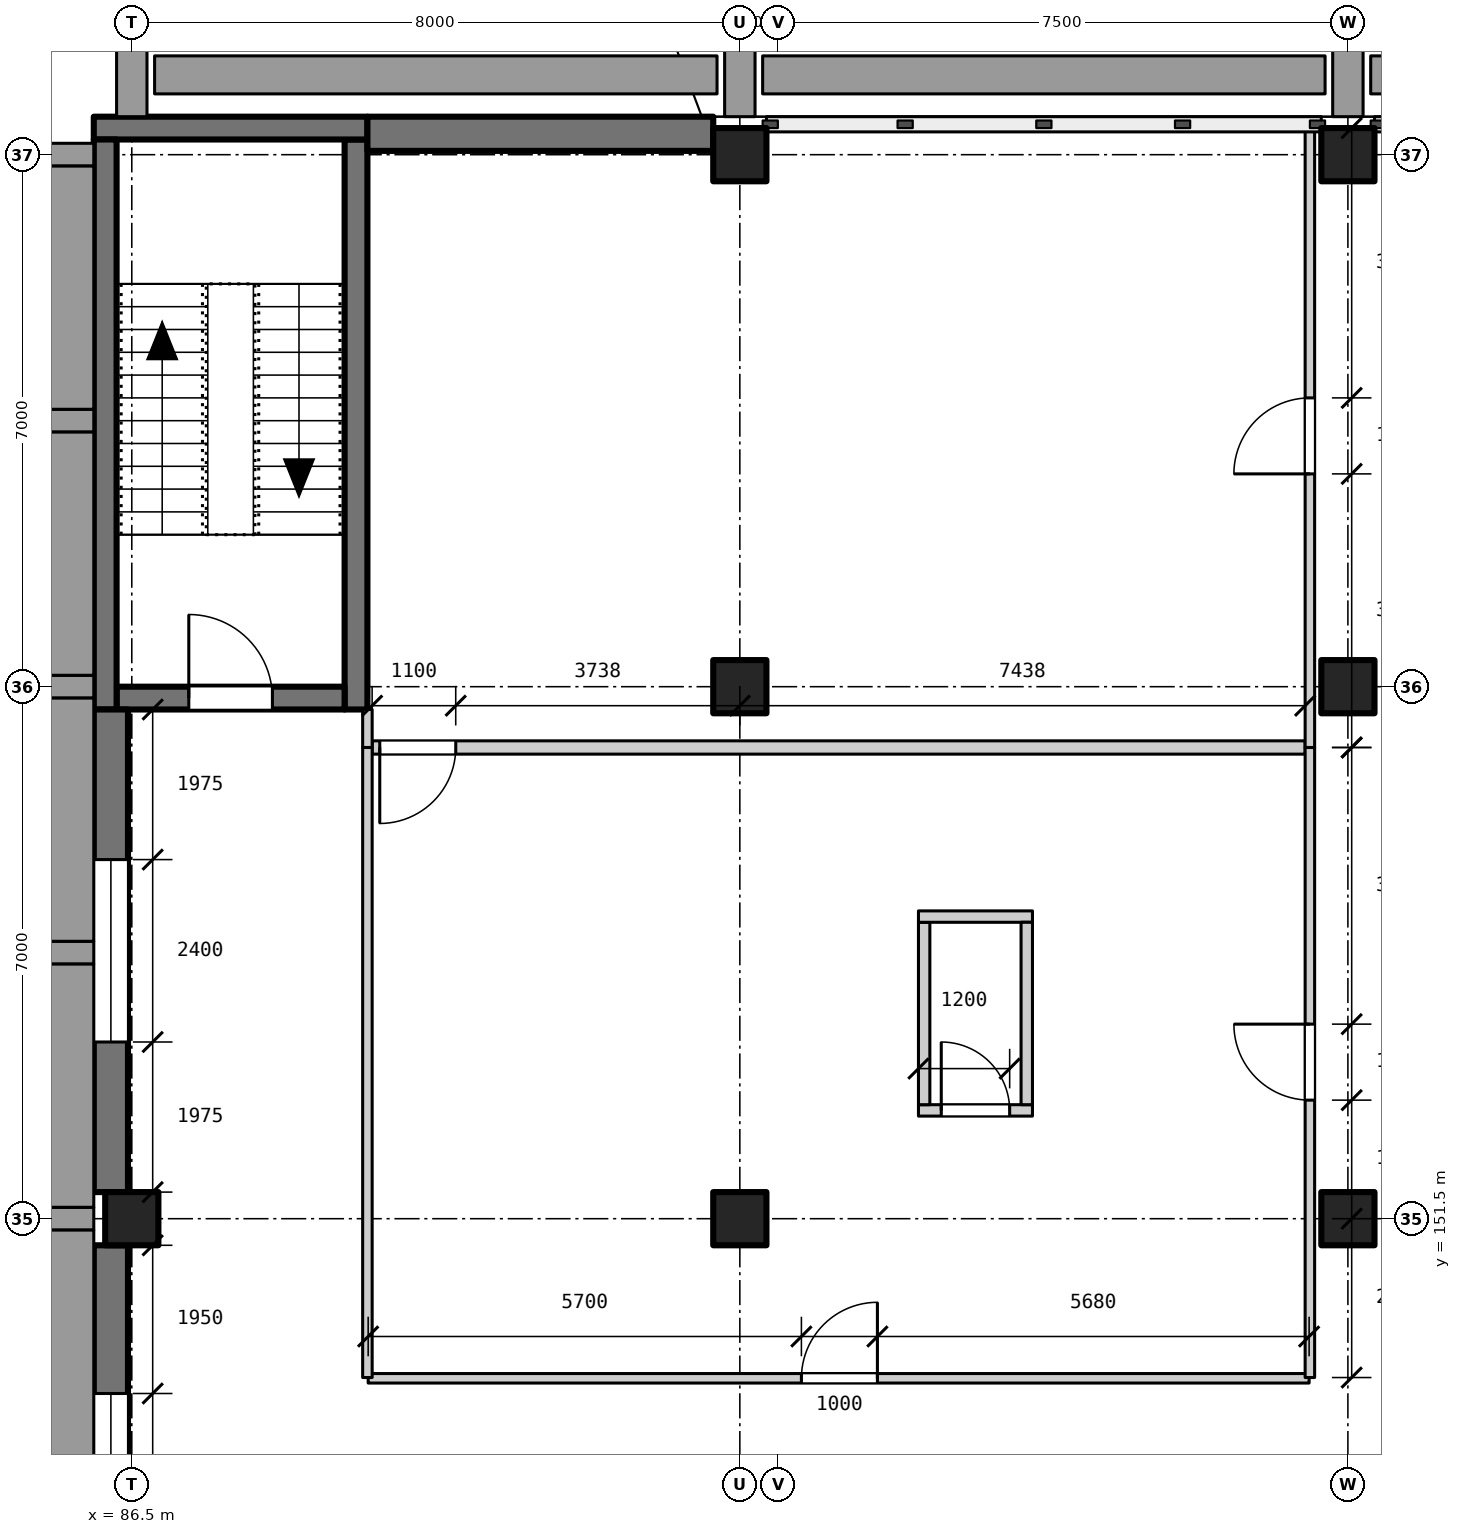
"""IFC4 building model, lengths in metres.
Left out: names, types, materials, properties, quantities, classifications, styles, units other than length and angle.
Written with IfcOpenShell. Run it as: python <this file> out.ifc"""

import sys

from ifc_helpers import new_model, si_unit, direction, frame, frame_2d, origin, origin_2d, place, context, subcontext, project, spatial, rectangle, extrude, element, fill, save


model = new_model("IFC4")
c1 = context("Model", 3, precision=1e-05, world=origin(), true_north=direction((0.0, 1.0)))
c2 = subcontext(c1, "Body", "Model", "MODEL_VIEW")
j1 = project(units=[si_unit("LENGTHUNIT", "METRE"), si_unit("PLANEANGLEUNIT", "RADIAN")], contexts=[c1])
p1 = place(None, origin())
s1 = spatial("IfcSite", under=j1, at=p1, CompositionType="ELEMENT")
p2 = place(p1, origin())
s2 = spatial("IfcBuilding", under=s1, at=p2, CompositionType="ELEMENT")
p3 = place(p2, frame((0.0, 0.0, 6.0)))
s3 = spatial("IfcBuildingStorey", under=s2, at=p3, CompositionType="ELEMENT", Elevation=6.0)
for number, where, z_axis, x_axis in (
    (1, (86.5, 151.5, 0.0), (0.0, 0.0, 1.0), (1.0, 0.0, 0.0)),
    (2, (94.5, 151.5, 0.0), (0.0, 0.0, 1.0), (1.0, 0.0, 0.0)),
    (3, (94.5, 158.5, 0.0), (0.0, 0.0, 1.0), (1.0, 0.0, 0.0)),
    (4, (94.5, 165.5, 0.0), (0.0, 0.0, 1.0), (1.0, 0.0, 0.0)),
    (5, (102.5, 151.5, 0.0), (0.0, 0.0, 1.0), (1.0, 0.0, 0.0)),
    (6, (102.5, 158.5, 0.0), (0.0, 0.0, 1.0), (1.0, 0.0, 0.0)),
    (7, (102.5, 165.5, 0.0), (0.0, 0.0, 1.0), (1.0, 0.0, 0.0)),
):
    element("IfcColumn", number, at=place(p3, frame(where, z_axis=z_axis, x_axis=x_axis)), inside=s3, PredefinedType="COLUMN", context=c2, shape_type="SweptSolid", body=[
        extrude(rectangle(XDim=0.7, YDim=0.7, at=origin_2d()), origin(), (0.0, 0.0, 1.0), 4.2),
    ])
p4 = place(p3, frame((89.45, 158.2, 0.0), z_axis=(0.0, 0.0, 1.0), x_axis=(0.0, 1.0, 0.0)))
e8 = element("IfcWall", 8, at=p4, inside=s3, PredefinedType="SHEAR", context=c2, shape_type="SweptSolid", body=[
    extrude(rectangle(XDim=7.5, YDim=0.3, at=frame_2d((3.75, 0.0))), origin(), (0.0, 0.0, 1.0), 4.2),
])
p5 = place(p3, frame((86.3, 158.35, 0.0), z_axis=(0.0, 0.0, 1.0), x_axis=(1.0, 0.0, 0.0)))
e9 = element("IfcWall", 9, at=p5, inside=s3, PredefinedType="SHEAR", context=c2, shape_type="SweptSolid", body=[
    extrude(rectangle(XDim=3.0, YDim=0.3, at=frame_2d((1.5, 0.0))), origin(), (0.0, 0.0, 1.0), 4.2),
])
p6 = place(p5, frame((0.95, 0.0, 0.0)))
e10 = element("IfcOpeningElement", 10, at=p6, cuts=e9, PredefinedType="OPENING", context=c2, shape_type="SweptSolid", body=[
    extrude(rectangle(XDim=1.1, YDim=2.1, at=frame_2d((0.55, 1.05))), frame((0.0, 0.16, 0.0), z_axis=(0.0, -1.0, 0.0), x_axis=(1.0, 0.0, 0.0)), (0.0, 0.0, 1.0), 0.32),
])
p7 = place(p3, frame((86.0, 165.85, 0.0), z_axis=(0.0, 0.0, 1.0), x_axis=(1.0, 0.0, 0.0)))
e11 = element("IfcWall", 11, at=p7, inside=s3, PredefinedType="SOLIDWALL", context=c2, shape_type="SweptSolid", body=[
    extrude(rectangle(XDim=3.6, YDim=0.3, at=frame_2d((1.8, 0.0))), origin(), (0.0, 0.0, 1.0), 3.9),
])
p8 = place(p3, frame((89.6, 165.775, 0.0), z_axis=(0.0, 0.0, 1.0), x_axis=(1.0, 0.0, 0.0)))
e12 = element("IfcWall", 12, at=p8, inside=s3, PredefinedType="SOLIDWALL", context=c2, shape_type="SweptSolid", body=[
    extrude(rectangle(XDim=4.55, YDim=0.45, at=frame_2d((2.275, 0.0))), origin(), (0.0, 0.0, 1.0), 3.1),
])
p9 = place(p3, frame((86.15, 158.2, 0.0), z_axis=(0.0, 0.0, 1.0), x_axis=(0.0, 1.0, 0.0)))
e13 = element("IfcWall", 13, at=p9, inside=s3, PredefinedType="SOLIDWALL", context=c2, shape_type="SweptSolid", body=[
    extrude(rectangle(XDim=7.5, YDim=0.3, at=frame_2d((3.75, 0.0))), origin(), (0.0, 0.0, 1.0), 3.9),
])
p10 = place(p3, frame((86.225, 144.85, 0.0), z_axis=(0.0, 0.0, 1.0), x_axis=(0.0, 1.0, 0.0)))
e14 = element("IfcWall", 14, at=p10, inside=s3, PredefinedType="SOLIDWALL", context=c2, shape_type="SweptSolid", body=[
    extrude(rectangle(XDim=6.3, YDim=0.45, at=frame_2d((3.15, 0.0))), origin(), (0.0, 0.0, 1.0), 3.2),
])
p11 = place(p10, frame((1.95, 0.0, 0.9)))
e15 = element("IfcOpeningElement", 15, at=p11, cuts=e14, PredefinedType="OPENING", context=c2, shape_type="SweptSolid", body=[
    extrude(rectangle(XDim=2.4, YDim=1.6, at=frame_2d((1.2, 0.8))), frame((0.0, 0.235, 0.0), z_axis=(0.0, -1.0, 0.0), x_axis=(1.0, 0.0, 0.0)), (0.0, 0.0, 1.0), 0.47),
])
p12 = place(p3, frame((86.225, 151.85, 0.0), z_axis=(0.0, 0.0, 1.0), x_axis=(0.0, 1.0, 0.0)))
e16 = element("IfcWall", 16, at=p12, inside=s3, PredefinedType="SOLIDWALL", context=c2, shape_type="SweptSolid", body=[
    extrude(rectangle(XDim=6.35, YDim=0.45, at=frame_2d((3.175, 0.0))), origin(), (0.0, 0.0, 1.0), 3.2),
])
p13 = place(p12, frame((1.975, 0.0, 0.9)))
e17 = element("IfcOpeningElement", 17, at=p13, cuts=e16, PredefinedType="OPENING", context=c2, shape_type="SweptSolid", body=[
    extrude(rectangle(XDim=2.4, YDim=1.6, at=frame_2d((1.2, 0.8))), frame((0.0, 0.235, 0.0), z_axis=(0.0, -1.0, 0.0), x_axis=(1.0, 0.0, 0.0)), (0.0, 0.0, 1.0), 0.47),
])
p14 = place(p3, frame((96.85, 152.925, 0.0), z_axis=(0.0, 0.0, 1.0), x_axis=(1.0, 0.0, 0.0)))
e18 = element("IfcWall", 18, at=p14, inside=s3, PredefinedType="PARTITIONING", context=c2, shape_type="SweptSolid", body=[
    extrude(rectangle(XDim=1.5, YDim=0.15, at=frame_2d((0.75, 0.0))), origin(), (0.0, 0.0, 1.0), 3.9),
])
p15 = place(p14, frame((0.3, 0.0, 0.0)))
e19 = element("IfcOpeningElement", 19, at=p15, cuts=e18, PredefinedType="OPENING", context=c2, shape_type="SweptSolid", body=[
    extrude(rectangle(XDim=0.9, YDim=2.1, at=frame_2d((0.45, 1.05))), frame((0.0, 0.085, 0.0), z_axis=(0.0, -1.0, 0.0), x_axis=(1.0, 0.0, 0.0)), (0.0, 0.0, 1.0), 0.17),
])
p16 = place(p3, frame((96.925, 153.0, 0.0), z_axis=(0.0, 0.0, 1.0), x_axis=(0.0, 1.0, 0.0)))
e20 = element("IfcWall", 20, at=p16, inside=s3, PredefinedType="PARTITIONING", context=c2, shape_type="SweptSolid", body=[
    extrude(rectangle(XDim=2.4, YDim=0.15, at=frame_2d((1.2, 0.0))), origin(), (0.0, 0.0, 1.0), 3.9),
])
p17 = place(p3, frame((96.85, 155.475, 0.0), z_axis=(0.0, 0.0, 1.0), x_axis=(1.0, 0.0, 0.0)))
e21 = element("IfcWall", 21, at=p17, inside=s3, PredefinedType="PARTITIONING", context=c2, shape_type="SweptSolid", body=[
    extrude(rectangle(XDim=1.5, YDim=0.15, at=frame_2d((0.75, 0.0))), origin(), (0.0, 0.0, 1.0), 3.9),
])
p18 = place(p3, frame((98.275, 153.0, 0.0), z_axis=(0.0, 0.0, 1.0), x_axis=(0.0, 1.0, 0.0)))
e22 = element("IfcWall", 22, at=p18, inside=s3, PredefinedType="PARTITIONING", context=c2, shape_type="SweptSolid", body=[
    extrude(rectangle(XDim=2.4, YDim=0.15, at=frame_2d((1.2, 0.0))), origin(), (0.0, 0.0, 1.0), 3.9),
])
p19 = place(p3, frame((89.61, 149.4, 0.0), z_axis=(0.0, 0.0, 1.0), x_axis=(1.0, 0.0, 0.0)))
e23 = element("IfcWall", 23, at=p19, inside=s3, PredefinedType="PARTITIONING", context=c2, shape_type="SweptSolid", body=[
    extrude(rectangle(XDim=12.38, YDim=0.125, at=frame_2d((6.19, 0.0))), origin(), (0.0, 0.0, 1.0), 3.9),
])
p20 = place(p19, frame((5.7, 0.0, 0.0)))
e24 = element("IfcOpeningElement", 24, at=p20, cuts=e23, PredefinedType="OPENING", context=c2, shape_type="SweptSolid", body=[
    extrude(rectangle(XDim=1.0, YDim=2.1, at=frame_2d((0.5, 1.05))), frame((0.0, 0.073, 0.0), z_axis=(0.0, -1.0, 0.0), x_axis=(1.0, 0.0, 0.0)), (0.0, 0.0, 1.0), 0.145),
])
p21 = place(p3, frame((89.663, 157.7, 0.0), z_axis=(0.0, 0.0, 1.0), x_axis=(1.0, 0.0, 0.0)))
e25 = element("IfcWall", 25, at=p21, inside=s3, PredefinedType="PARTITIONING", context=c2, shape_type="SweptSolid", body=[
    extrude(rectangle(XDim=12.275, YDim=0.175, at=frame_2d((6.137, 0.0))), origin(), (0.0, 0.0, 1.0), 3.9),
])
p22 = place(p21, frame((0.1, 0.0, 0.0)))
e26 = element("IfcOpeningElement", 26, at=p22, cuts=e25, PredefinedType="OPENING", context=c2, shape_type="SweptSolid", body=[
    extrude(rectangle(XDim=1.0, YDim=2.1, at=frame_2d((0.5, 1.05))), frame((0.0, 0.097, 0.0), z_axis=(0.0, -1.0, 0.0), x_axis=(1.0, 0.0, 0.0)), (0.0, 0.0, 1.0), 0.195),
])
p23 = place(p3, frame((89.6, 149.41, 0.0), z_axis=(0.0, 0.0, 1.0), x_axis=(0.0, 1.0, 0.0)))
e27 = element("IfcWall", 27, at=p23, inside=s3, PredefinedType="PARTITIONING", context=c2, shape_type="SweptSolid", body=[
    extrude(rectangle(XDim=8.29, YDim=0.125, at=frame_2d((4.145, 0.0))), origin(), (0.0, 0.0, 1.0), 3.9),
])
p24 = place(p3, frame((89.6, 157.7, 0.0), z_axis=(0.0, 0.0, 1.0), x_axis=(0.0, 1.0, 0.0)))
e28 = element("IfcWall", 28, at=p24, inside=s3, PredefinedType="PARTITIONING", context=c2, shape_type="SweptSolid", body=[
    extrude(rectangle(XDim=0.5, YDim=0.125, at=frame_2d((0.25, 0.0))), origin(), (0.0, 0.0, 1.0), 3.9),
])
p25 = place(p3, frame((102.0, 149.41, 0.0), z_axis=(0.0, 0.0, 1.0), x_axis=(0.0, 1.0, 0.0)))
e29 = element("IfcWall", 29, at=p25, inside=s3, PredefinedType="PARTITIONING", context=c2, shape_type="SweptSolid", body=[
    extrude(rectangle(XDim=8.29, YDim=0.125, at=frame_2d((4.145, 0.0))), origin(), (0.0, 0.0, 1.0), 3.9),
])
p26 = place(p25, frame((3.65, 0.0, 0.0)))
e30 = element("IfcOpeningElement", 30, at=p26, cuts=e29, PredefinedType="OPENING", context=c2, shape_type="SweptSolid", body=[
    extrude(rectangle(XDim=1.0, YDim=2.1, at=frame_2d((0.5, 1.05))), frame((0.0, 0.073, 0.0), z_axis=(0.0, -1.0, 0.0), x_axis=(1.0, 0.0, 0.0)), (0.0, 0.0, 1.0), 0.145),
])
p27 = place(p3, frame((102.0, 157.7, 0.0), z_axis=(0.0, 0.0, 1.0), x_axis=(0.0, 1.0, 0.0)))
e31 = element("IfcWall", 31, at=p27, inside=s3, PredefinedType="PARTITIONING", context=c2, shape_type="SweptSolid", body=[
    extrude(rectangle(XDim=8.15, YDim=0.125, at=frame_2d((4.075, 0.0))), origin(), (0.0, 0.0, 1.0), 3.9),
])
p28 = place(p27, frame((3.6, 0.0, 0.0)))
e32 = element("IfcOpeningElement", 32, at=p28, cuts=e31, PredefinedType="OPENING", context=c2, shape_type="SweptSolid", body=[
    extrude(rectangle(XDim=1.0, YDim=2.1, at=frame_2d((0.5, 1.05))), frame((0.0, 0.073, 0.0), z_axis=(0.0, -1.0, 0.0), x_axis=(1.0, 0.0, 0.0)), (0.0, 0.0, 1.0), 0.145),
])
p29 = place(p11, origin())
e33 = element("IfcWindow", 33, at=p29, inside=s3, PartitioningType="SINGLE_PANEL", PredefinedType="WINDOW", context=c2, shape_type="SweptSolid", body=[
    extrude(rectangle(XDim=2.4, YDim=1.6, at=frame_2d((1.2, 0.8))), frame((0.0, -0.125, 0.0), z_axis=(0.0, -1.0, 0.0), x_axis=(1.0, 0.0, 0.0)), (0.0, 0.0, 1.0), 0.06),
])
fill(e15, e33)
p30 = place(p13, origin())
e34 = element("IfcWindow", 34, at=p30, inside=s3, PartitioningType="SINGLE_PANEL", PredefinedType="WINDOW", context=c2, shape_type="SweptSolid", body=[
    extrude(rectangle(XDim=2.4, YDim=1.6, at=frame_2d((1.2, 0.8))), frame((0.0, -0.125, 0.0), z_axis=(0.0, -1.0, 0.0), x_axis=(1.0, 0.0, 0.0)), (0.0, 0.0, 1.0), 0.06),
])
fill(e17, e34)
p31 = place(p20, origin())
e35 = element("IfcDoor", 35, at=p31, inside=s3, OperationType="SINGLE_SWING_RIGHT", PredefinedType="DOOR", context=c2, shape_type="SweptSolid", body=[
    extrude(rectangle(XDim=1.0, YDim=2.1, at=frame_2d((0.5, 1.05))), frame((0.0, 0.025, 0.0), z_axis=(0.0, -1.0, 0.0), x_axis=(1.0, 0.0, 0.0)), (0.0, 0.0, 1.0), 0.05),
])
fill(e24, e35)
p32 = place(p15, origin())
e36 = element("IfcDoor", 36, at=p32, inside=s3, OperationType="SINGLE_SWING_LEFT", PredefinedType="DOOR", context=c2, shape_type="SweptSolid", body=[
    extrude(rectangle(XDim=0.9, YDim=2.1, at=frame_2d((0.45, 1.05))), frame((0.0, 0.025, 0.0), z_axis=(0.0, -1.0, 0.0), x_axis=(1.0, 0.0, 0.0)), (0.0, 0.0, 1.0), 0.05),
])
fill(e19, e36)
p33 = place(p26, origin())
e37 = element("IfcDoor", 37, at=p33, inside=s3, OperationType="SINGLE_SWING_RIGHT", PredefinedType="DOOR", context=c2, shape_type="SweptSolid", body=[
    extrude(rectangle(XDim=1.0, YDim=2.1, at=frame_2d((0.5, 1.05))), frame((0.0, 0.025, 0.0), z_axis=(0.0, -1.0, 0.0), x_axis=(1.0, 0.0, 0.0)), (0.0, 0.0, 1.0), 0.05),
])
fill(e30, e37)
p34 = place(p22, frame((1.0, 0.0, 0.0), z_axis=(0.0, 0.0, 1.0), x_axis=(-1.0, 0.0, 0.0)))
e38 = element("IfcDoor", 38, at=p34, inside=s3, OperationType="SINGLE_SWING_RIGHT", PredefinedType="DOOR", context=c2, shape_type="SweptSolid", body=[
    extrude(rectangle(XDim=1.0, YDim=2.1, at=frame_2d((0.5, 1.05))), frame((0.0, 0.025, 0.0), z_axis=(0.0, -1.0, 0.0), x_axis=(1.0, 0.0, 0.0)), (0.0, 0.0, 1.0), 0.05),
])
fill(e26, e38)
p35 = place(p28, origin())
e39 = element("IfcDoor", 39, at=p35, inside=s3, OperationType="SINGLE_SWING_LEFT", PredefinedType="DOOR", context=c2, shape_type="SweptSolid", body=[
    extrude(rectangle(XDim=1.0, YDim=2.1, at=frame_2d((0.5, 1.05))), frame((0.0, 0.025, 0.0), z_axis=(0.0, -1.0, 0.0), x_axis=(1.0, 0.0, 0.0)), (0.0, 0.0, 1.0), 0.05),
])
fill(e32, e39)
p36 = place(p6, origin())
e40 = element("IfcDoor", 40, at=p36, inside=s3, OperationType="SINGLE_SWING_LEFT", PredefinedType="DOOR", context=c2, shape_type="SweptSolid", body=[
    extrude(rectangle(XDim=1.1, YDim=2.1, at=frame_2d((0.55, 1.05))), frame((0.0, 0.025, 0.0), z_axis=(0.0, -1.0, 0.0), x_axis=(1.0, 0.0, 0.0)), (0.0, 0.0, 1.0), 0.05),
])
fill(e10, e40)
save(model, sys.argv[1])
